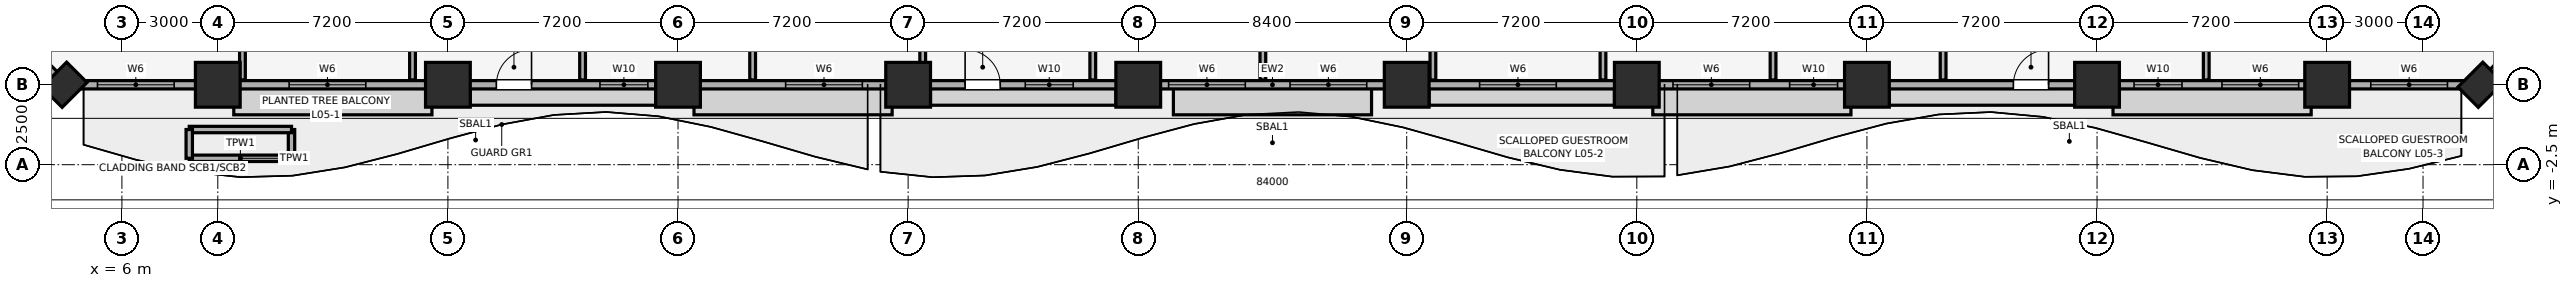
"""IFC4 building model, lengths in metres.
Left out: names, types, materials, properties, quantities, classifications, styles, units other than length and angle.
Written with IfcOpenShell. Run it as: python <this file> out.ifc"""

import sys

from ifc_helpers import new_model, si_unit, direction, frame, frame_2d, origin, origin_2d, place, context, subcontext, project, spatial, rectangle, extrude, element, fill, save


model = new_model("IFC4")
c1 = context("Model", 3, precision=1e-05, world=origin(), true_north=direction((0.0, 1.0)))
c2 = subcontext(c1, "Body", "Model", "MODEL_VIEW")
j1 = project(units=[si_unit("LENGTHUNIT", "METRE"), si_unit("PLANEANGLEUNIT", "RADIAN")], contexts=[c1])
p1 = place(None, origin())
s1 = spatial("IfcSite", under=j1, at=p1, CompositionType="ELEMENT")
p2 = place(p1, origin())
s2 = spatial("IfcBuilding", under=s1, at=p2, CompositionType="ELEMENT")
p3 = place(p2, frame((0.0, 0.0, 31.4)))
s3 = spatial("IfcBuildingStorey", under=s2, at=p3, CompositionType="ELEMENT", Elevation=31.4)
for number, where, z_axis, x_axis in (
    (1, (9.0, 0.0, 0.0), (0.0, 0.0, 1.0), (1.0, 0.0, 0.0)),
    (2, (16.2, 0.0, 0.0), (0.0, 0.0, 1.0), (1.0, 0.0, 0.0)),
    (3, (23.4, 0.0, 0.0), (0.0, 0.0, 1.0), (1.0, 0.0, 0.0)),
    (4, (30.6, 0.0, 0.0), (0.0, 0.0, 1.0), (1.0, 0.0, 0.0)),
    (5, (37.8, 0.0, 0.0), (0.0, 0.0, 1.0), (1.0, 0.0, 0.0)),
    (6, (46.2, 0.0, 0.0), (0.0, 0.0, 1.0), (1.0, 0.0, 0.0)),
    (7, (53.4, 0.0, 0.0), (0.0, 0.0, 1.0), (1.0, 0.0, 0.0)),
    (8, (60.6, 0.0, 0.0), (0.0, 0.0, 1.0), (1.0, 0.0, 0.0)),
    (9, (67.8, 0.0, 0.0), (0.0, 0.0, 1.0), (1.0, 0.0, 0.0)),
    (10, (75.0, 0.0, 0.0), (0.0, 0.0, 1.0), (1.0, 0.0, 0.0)),
):
    element("IfcColumn", number, at=place(p3, frame(where, z_axis=z_axis, x_axis=x_axis)), inside=s3, PredefinedType="COLUMN", context=c2, shape_type="SweptSolid", body=[
        extrude(rectangle(XDim=1.4, YDim=1.4, at=origin_2d()), origin(), (0.0, 0.0, 1.0), 3.51),
    ])
for number, where, z_axis, x_axis in (
    (11, (4.2, 0.0, 0.0), (0.0, 0.0, 1.0), (0.707, 0.707, 0.0)),
    (12, (79.8, 0.0, 0.0), (0.0, 0.0, 1.0), (0.707, 0.707, 0.0)),
):
    element("IfcColumn", number, at=place(p3, frame(where, z_axis=z_axis, x_axis=x_axis)), inside=s3, PredefinedType="PILASTER", context=c2, shape_type="SweptSolid", body=[
        extrude(rectangle(XDim=1.1, YDim=0.9, at=origin_2d()), origin(), (0.0, 0.0, 1.0), 3.51),
    ])
p4 = place(p3, frame((4.2, 0.0, 0.0), z_axis=(0.0, 0.0, 1.0), x_axis=(1.0, 0.0, 0.0)))
e13 = element("IfcWall", 13, at=p4, inside=s3, PredefinedType="SOLIDWALL", context=c2, shape_type="SweptSolid", body=[
    extrude(rectangle(XDim=75.6, YDim=0.26, at=frame_2d((37.8, 0.0))), origin(), (0.0, 0.0, 1.0), 2.56),
])
p5 = place(p4, frame((13.517, 0.0, 0.0)))
e14 = element("IfcOpeningElement", 14, at=p5, cuts=e13, PredefinedType="OPENING", context=c2, shape_type="SweptSolid", body=[
    extrude(rectangle(XDim=1.1, YDim=2.15, at=frame_2d((0.55, 1.075))), frame((0.0, 0.14, 0.0), z_axis=(0.0, -1.0, 0.0), x_axis=(1.0, 0.0, 0.0)), (0.0, 0.0, 1.0), 0.28),
])
p6 = place(p4, frame((28.183, 0.0, 0.0)))
e15 = element("IfcOpeningElement", 15, at=p6, cuts=e13, PredefinedType="OPENING", context=c2, shape_type="SweptSolid", body=[
    extrude(rectangle(XDim=1.1, YDim=2.15, at=frame_2d((0.55, 1.075))), frame((0.0, 0.14, 0.0), z_axis=(0.0, -1.0, 0.0), x_axis=(1.0, 0.0, 0.0)), (0.0, 0.0, 1.0), 0.28),
])
p7 = place(p4, frame((60.983, 0.0, 0.0)))
e16 = element("IfcOpeningElement", 16, at=p7, cuts=e13, PredefinedType="OPENING", context=c2, shape_type="SweptSolid", body=[
    extrude(rectangle(XDim=1.1, YDim=2.15, at=frame_2d((0.55, 1.075))), frame((0.0, 0.14, 0.0), z_axis=(0.0, -1.0, 0.0), x_axis=(1.0, 0.0, 0.0)), (0.0, 0.0, 1.0), 0.28),
])
p8 = place(p4, frame((1.035, 0.0, 0.85)))
e17 = element("IfcOpeningElement", 17, at=p8, cuts=e13, PredefinedType="OPENING", context=c2, shape_type="SweptSolid", body=[
    extrude(rectangle(XDim=2.4, YDim=1.5, at=frame_2d((1.2, 0.75))), frame((0.0, 0.14, 0.0), z_axis=(0.0, -1.0, 0.0), x_axis=(1.0, 0.0, 0.0)), (0.0, 0.0, 1.0), 0.28),
])
p9 = place(p4, frame((7.031, 0.0, 0.85)))
e18 = element("IfcOpeningElement", 18, at=p9, cuts=e13, PredefinedType="OPENING", context=c2, shape_type="SweptSolid", body=[
    extrude(rectangle(XDim=2.4, YDim=1.5, at=frame_2d((1.2, 0.75))), frame((0.0, 0.14, 0.0), z_axis=(0.0, -1.0, 0.0), x_axis=(1.0, 0.0, 0.0)), (0.0, 0.0, 1.0), 0.28),
])
p10 = place(p4, frame((16.757, 0.0, 0.85)))
e19 = element("IfcOpeningElement", 19, at=p10, cuts=e13, PredefinedType="OPENING", context=c2, shape_type="SweptSolid", body=[
    extrude(rectangle(XDim=1.5, YDim=1.4, at=frame_2d((0.75, 0.7))), frame((0.0, 0.14, 0.0), z_axis=(0.0, -1.0, 0.0), x_axis=(1.0, 0.0, 0.0)), (0.0, 0.0, 1.0), 0.28),
])
p11 = place(p4, frame((22.567, 0.0, 0.85)))
e20 = element("IfcOpeningElement", 20, at=p11, cuts=e13, PredefinedType="OPENING", context=c2, shape_type="SweptSolid", body=[
    extrude(rectangle(XDim=2.4, YDim=1.5, at=frame_2d((1.2, 0.75))), frame((0.0, 0.14, 0.0), z_axis=(0.0, -1.0, 0.0), x_axis=(1.0, 0.0, 0.0)), (0.0, 0.0, 1.0), 0.28),
])
p12 = place(p4, frame((30.065, 0.0, 0.85)))
e21 = element("IfcOpeningElement", 21, at=p12, cuts=e13, PredefinedType="OPENING", context=c2, shape_type="SweptSolid", body=[
    extrude(rectangle(XDim=1.5, YDim=1.4, at=frame_2d((0.75, 0.7))), frame((0.0, 0.14, 0.0), z_axis=(0.0, -1.0, 0.0), x_axis=(1.0, 0.0, 0.0)), (0.0, 0.0, 1.0), 0.28),
])
p13 = place(p4, frame((34.55, 0.0, 0.85)))
e22 = element("IfcOpeningElement", 22, at=p13, cuts=e13, PredefinedType="OPENING", context=c2, shape_type="SweptSolid", body=[
    extrude(rectangle(XDim=2.4, YDim=1.5, at=frame_2d((1.2, 0.75))), frame((0.0, 0.14, 0.0), z_axis=(0.0, -1.0, 0.0), x_axis=(1.0, 0.0, 0.0)), (0.0, 0.0, 1.0), 0.28),
])
p14 = place(p4, frame((38.35, 0.0, 0.85)))
e23 = element("IfcOpeningElement", 23, at=p14, cuts=e13, PredefinedType="OPENING", context=c2, shape_type="SweptSolid", body=[
    extrude(rectangle(XDim=2.4, YDim=1.5, at=frame_2d((1.2, 0.75))), frame((0.0, 0.14, 0.0), z_axis=(0.0, -1.0, 0.0), x_axis=(1.0, 0.0, 0.0)), (0.0, 0.0, 1.0), 0.28),
])
p15 = place(p4, frame((44.281, 0.0, 0.85)))
e24 = element("IfcOpeningElement", 24, at=p15, cuts=e13, PredefinedType="OPENING", context=c2, shape_type="SweptSolid", body=[
    extrude(rectangle(XDim=2.4, YDim=1.5, at=frame_2d((1.2, 0.75))), frame((0.0, 0.14, 0.0), z_axis=(0.0, -1.0, 0.0), x_axis=(1.0, 0.0, 0.0)), (0.0, 0.0, 1.0), 0.28),
])
p16 = place(p4, frame((50.332, 0.0, 0.85)))
e25 = element("IfcOpeningElement", 25, at=p16, cuts=e13, PredefinedType="OPENING", context=c2, shape_type="SweptSolid", body=[
    extrude(rectangle(XDim=2.4, YDim=1.5, at=frame_2d((1.2, 0.75))), frame((0.0, 0.14, 0.0), z_axis=(0.0, -1.0, 0.0), x_axis=(1.0, 0.0, 0.0)), (0.0, 0.0, 1.0), 0.28),
])
p17 = place(p4, frame((53.981, 0.0, 0.85)))
e26 = element("IfcOpeningElement", 26, at=p17, cuts=e13, PredefinedType="OPENING", context=c2, shape_type="SweptSolid", body=[
    extrude(rectangle(XDim=1.5, YDim=1.4, at=frame_2d((0.75, 0.7))), frame((0.0, 0.14, 0.0), z_axis=(0.0, -1.0, 0.0), x_axis=(1.0, 0.0, 0.0)), (0.0, 0.0, 1.0), 0.28),
])
p18 = place(p4, frame((64.759, 0.0, 0.85)))
e27 = element("IfcOpeningElement", 27, at=p18, cuts=e13, PredefinedType="OPENING", context=c2, shape_type="SweptSolid", body=[
    extrude(rectangle(XDim=1.5, YDim=1.4, at=frame_2d((0.75, 0.7))), frame((0.0, 0.14, 0.0), z_axis=(0.0, -1.0, 0.0), x_axis=(1.0, 0.0, 0.0)), (0.0, 0.0, 1.0), 0.28),
])
p19 = place(p4, frame((67.509, 0.0, 0.85)))
e28 = element("IfcOpeningElement", 28, at=p19, cuts=e13, PredefinedType="OPENING", context=c2, shape_type="SweptSolid", body=[
    extrude(rectangle(XDim=2.4, YDim=1.5, at=frame_2d((1.2, 0.75))), frame((0.0, 0.14, 0.0), z_axis=(0.0, -1.0, 0.0), x_axis=(1.0, 0.0, 0.0)), (0.0, 0.0, 1.0), 0.28),
])
p20 = place(p4, frame((72.165, 0.0, 0.85)))
e29 = element("IfcOpeningElement", 29, at=p20, cuts=e13, PredefinedType="OPENING", context=c2, shape_type="SweptSolid", body=[
    extrude(rectangle(XDim=2.4, YDim=1.5, at=frame_2d((1.2, 0.75))), frame((0.0, 0.14, 0.0), z_axis=(0.0, -1.0, 0.0), x_axis=(1.0, 0.0, 0.0)), (0.0, 0.0, 1.0), 0.28),
])
for number, where, z_axis, x_axis in (
    (30, (79.8, 0.0, 0.0), (0.0, 0.0, 1.0), (0.707, 0.707, 0.0)),
    (31, (0.0, 4.2, 0.0), (0.0, 0.0, 1.0), (0.707, -0.707, 0.0)),
):
    element("IfcWall", number, at=place(p3, frame(where, z_axis=z_axis, x_axis=x_axis)), inside=s3, PredefinedType="SOLIDWALL", context=c2, shape_type="SweptSolid", body=[
        extrude(rectangle(XDim=5.94, YDim=0.26, at=frame_2d((2.97, 0.0))), origin(), (0.0, 0.0, 1.0), 2.56),
    ])
p21 = place(p3, frame((8.107, -2.3, 0.0), z_axis=(0.0, 0.0, 1.0), x_axis=(1.0, 0.0, 0.0)))
e32 = element("IfcWall", 32, at=p21, inside=s3, PredefinedType="PARAPET", context=c2, shape_type="SweptSolid", body=[
    extrude(rectangle(XDim=3.2, YDim=0.2, at=frame_2d((1.6, 0.0))), origin(), (0.0, 0.0, 1.0), 0.55),
])
p22 = place(p3, frame((11.307, -2.3, 0.0), z_axis=(0.0, 0.0, 1.0), x_axis=(0.0, 1.0, 0.0)))
e33 = element("IfcWall", 33, at=p22, inside=s3, PredefinedType="PARAPET", context=c2, shape_type="SweptSolid", body=[
    extrude(rectangle(XDim=0.9, YDim=0.2, at=frame_2d((0.45, 0.0))), origin(), (0.0, 0.0, 1.0), 0.55),
])
p23 = place(p3, frame((11.307, -1.4, 0.0), z_axis=(0.0, 0.0, 1.0), x_axis=(-1.0, 0.0, 0.0)))
e34 = element("IfcWall", 34, at=p23, inside=s3, PredefinedType="PARAPET", context=c2, shape_type="SweptSolid", body=[
    extrude(rectangle(XDim=3.2, YDim=0.2, at=frame_2d((1.6, 0.0))), origin(), (0.0, 0.0, 1.0), 0.55),
])
p24 = place(p3, frame((8.107, -1.4, 0.0), z_axis=(0.0, 0.0, 1.0), x_axis=(0.0, -1.0, 0.0)))
e35 = element("IfcWall", 35, at=p24, inside=s3, PredefinedType="PARAPET", context=c2, shape_type="SweptSolid", body=[
    extrude(rectangle(XDim=0.9, YDim=0.2, at=frame_2d((0.45, 0.0))), origin(), (0.0, 0.0, 1.0), 0.55),
])
p25 = place(p3, frame((9.771, 0.15, 0.0), z_axis=(0.0, 0.0, 1.0), x_axis=(0.0, 1.0, 0.0)))
e36 = element("IfcWall", 36, at=p25, inside=s3, PredefinedType="PARTITIONING", context=c2, shape_type="SweptSolid", body=[
    extrude(rectangle(XDim=8.555, YDim=0.18, at=frame_2d((4.278, 0.0))), origin(), (0.0, 0.0, 1.0), 2.88),
])
for number, where, z_axis, x_axis in (
    (37, (15.093, 0.15, 0.0), (0.0, 0.0, 1.0), (0.0, 1.0, 0.0)),
    (38, (20.414, 0.15, 0.0), (0.0, 0.0, 1.0), (0.0, 1.0, 0.0)),
    (39, (25.735, 0.15, 0.0), (0.0, 0.0, 1.0), (0.0, 1.0, 0.0)),
):
    element("IfcWall", number, at=place(p3, frame(where, z_axis=z_axis, x_axis=x_axis)), inside=s3, PredefinedType="PARTITIONING", context=c2, shape_type="SweptSolid", body=[
        extrude(rectangle(XDim=8.555, YDim=0.18, at=frame_2d((4.278, 0.0))), origin(), (0.0, 0.0, 1.0), 3.51),
    ])
p26 = place(p3, frame((31.056, 0.15, 0.0), z_axis=(0.0, 0.0, 1.0), x_axis=(0.0, 1.0, 0.0)))
e40 = element("IfcWall", 40, at=p26, inside=s3, PredefinedType="PARTITIONING", context=c2, shape_type="SweptSolid", body=[
    extrude(rectangle(XDim=8.555, YDim=0.18, at=frame_2d((4.278, 0.0))), origin(), (0.0, 0.0, 1.0), 2.88),
])
for number, where, z_axis, x_axis in (
    (41, (36.377, 0.15, 0.0), (0.0, 0.0, 1.0), (0.0, 1.0, 0.0)),
    (42, (41.699, 0.15, 0.0), (0.0, 0.0, 1.0), (0.0, 1.0, 0.0)),
    (43, (47.02, 0.15, 0.0), (0.0, 0.0, 1.0), (0.0, 1.0, 0.0)),
    (44, (52.341, 0.15, 0.0), (0.0, 0.0, 1.0), (0.0, 1.0, 0.0)),
    (45, (57.663, 0.15, 0.0), (0.0, 0.0, 1.0), (0.0, 1.0, 0.0)),
    (46, (62.984, 0.15, 0.0), (0.0, 0.0, 1.0), (0.0, 1.0, 0.0)),
):
    element("IfcWall", number, at=place(p3, frame(where, z_axis=z_axis, x_axis=x_axis)), inside=s3, PredefinedType="PARTITIONING", context=c2, shape_type="SweptSolid", body=[
        extrude(rectangle(XDim=8.555, YDim=0.18, at=frame_2d((4.278, 0.0))), origin(), (0.0, 0.0, 1.0), 3.51),
    ])
p27 = place(p3, frame((71.217, 0.15, 0.0), z_axis=(0.0, 0.0, 1.0), x_axis=(0.0, 1.0, 0.0)))
e47 = element("IfcWall", 47, at=p27, inside=s3, PredefinedType="PARTITIONING", context=c2, shape_type="SweptSolid", body=[
    extrude(rectangle(XDim=8.555, YDim=0.18, at=frame_2d((4.278, 0.0))), origin(), (0.0, 0.0, 1.0), 2.898),
])
p28 = place(p5, origin())
e48 = element("IfcDoor", 48, at=p28, inside=s3, OperationType="SINGLE_SWING_RIGHT", PredefinedType="DOOR", context=c2, shape_type="SweptSolid", body=[
    extrude(rectangle(XDim=1.1, YDim=2.15, at=frame_2d((0.55, 1.075))), frame((0.0, 0.025, 0.0), z_axis=(0.0, -1.0, 0.0), x_axis=(1.0, 0.0, 0.0)), (0.0, 0.0, 1.0), 0.05),
])
fill(e14, e48)
p29 = place(p6, origin())
e49 = element("IfcDoor", 49, at=p29, inside=s3, OperationType="SINGLE_SWING_LEFT", PredefinedType="DOOR", context=c2, shape_type="SweptSolid", body=[
    extrude(rectangle(XDim=1.1, YDim=2.15, at=frame_2d((0.55, 1.075))), frame((0.0, 0.025, 0.0), z_axis=(0.0, -1.0, 0.0), x_axis=(1.0, 0.0, 0.0)), (0.0, 0.0, 1.0), 0.05),
])
fill(e15, e49)
p30 = place(p7, origin())
e50 = element("IfcDoor", 50, at=p30, inside=s3, OperationType="SINGLE_SWING_RIGHT", PredefinedType="DOOR", context=c2, shape_type="SweptSolid", body=[
    extrude(rectangle(XDim=1.1, YDim=2.15, at=frame_2d((0.55, 1.075))), frame((0.0, 0.025, 0.0), z_axis=(0.0, -1.0, 0.0), x_axis=(1.0, 0.0, 0.0)), (0.0, 0.0, 1.0), 0.05),
])
fill(e16, e50)
p31 = place(p8, origin())
e51 = element("IfcWindow", 51, at=p31, inside=s3, PartitioningType="SINGLE_PANEL", PredefinedType="WINDOW", context=c2, shape_type="SweptSolid", body=[
    extrude(rectangle(XDim=2.4, YDim=1.5, at=frame_2d((1.2, 0.75))), frame((0.0, 0.03, 0.0), z_axis=(0.0, -1.0, 0.0), x_axis=(1.0, 0.0, 0.0)), (0.0, 0.0, 1.0), 0.06),
])
fill(e17, e51)
p32 = place(p9, origin())
e52 = element("IfcWindow", 52, at=p32, inside=s3, PartitioningType="SINGLE_PANEL", PredefinedType="WINDOW", context=c2, shape_type="SweptSolid", body=[
    extrude(rectangle(XDim=2.4, YDim=1.5, at=frame_2d((1.2, 0.75))), frame((0.0, 0.03, 0.0), z_axis=(0.0, -1.0, 0.0), x_axis=(1.0, 0.0, 0.0)), (0.0, 0.0, 1.0), 0.06),
])
fill(e18, e52)
p33 = place(p10, origin())
e53 = element("IfcWindow", 53, at=p33, inside=s3, PartitioningType="SINGLE_PANEL", PredefinedType="WINDOW", context=c2, shape_type="SweptSolid", body=[
    extrude(rectangle(XDim=1.5, YDim=1.4, at=frame_2d((0.75, 0.7))), frame((0.0, 0.03, 0.0), z_axis=(0.0, -1.0, 0.0), x_axis=(1.0, 0.0, 0.0)), (0.0, 0.0, 1.0), 0.06),
])
fill(e19, e53)
p34 = place(p11, origin())
e54 = element("IfcWindow", 54, at=p34, inside=s3, PartitioningType="SINGLE_PANEL", PredefinedType="WINDOW", context=c2, shape_type="SweptSolid", body=[
    extrude(rectangle(XDim=2.4, YDim=1.5, at=frame_2d((1.2, 0.75))), frame((0.0, 0.03, 0.0), z_axis=(0.0, -1.0, 0.0), x_axis=(1.0, 0.0, 0.0)), (0.0, 0.0, 1.0), 0.06),
])
fill(e20, e54)
p35 = place(p12, origin())
e55 = element("IfcWindow", 55, at=p35, inside=s3, PartitioningType="SINGLE_PANEL", PredefinedType="WINDOW", context=c2, shape_type="SweptSolid", body=[
    extrude(rectangle(XDim=1.5, YDim=1.4, at=frame_2d((0.75, 0.7))), frame((0.0, 0.03, 0.0), z_axis=(0.0, -1.0, 0.0), x_axis=(1.0, 0.0, 0.0)), (0.0, 0.0, 1.0), 0.06),
])
fill(e21, e55)
p36 = place(p13, origin())
e56 = element("IfcWindow", 56, at=p36, inside=s3, PartitioningType="SINGLE_PANEL", PredefinedType="WINDOW", context=c2, shape_type="SweptSolid", body=[
    extrude(rectangle(XDim=2.4, YDim=1.5, at=frame_2d((1.2, 0.75))), frame((0.0, 0.03, 0.0), z_axis=(0.0, -1.0, 0.0), x_axis=(1.0, 0.0, 0.0)), (0.0, 0.0, 1.0), 0.06),
])
fill(e22, e56)
p37 = place(p14, origin())
e57 = element("IfcWindow", 57, at=p37, inside=s3, PartitioningType="SINGLE_PANEL", PredefinedType="WINDOW", context=c2, shape_type="SweptSolid", body=[
    extrude(rectangle(XDim=2.4, YDim=1.5, at=frame_2d((1.2, 0.75))), frame((0.0, 0.03, 0.0), z_axis=(0.0, -1.0, 0.0), x_axis=(1.0, 0.0, 0.0)), (0.0, 0.0, 1.0), 0.06),
])
fill(e23, e57)
p38 = place(p15, origin())
e58 = element("IfcWindow", 58, at=p38, inside=s3, PartitioningType="SINGLE_PANEL", PredefinedType="WINDOW", context=c2, shape_type="SweptSolid", body=[
    extrude(rectangle(XDim=2.4, YDim=1.5, at=frame_2d((1.2, 0.75))), frame((0.0, 0.03, 0.0), z_axis=(0.0, -1.0, 0.0), x_axis=(1.0, 0.0, 0.0)), (0.0, 0.0, 1.0), 0.06),
])
fill(e24, e58)
p39 = place(p16, origin())
e59 = element("IfcWindow", 59, at=p39, inside=s3, PartitioningType="SINGLE_PANEL", PredefinedType="WINDOW", context=c2, shape_type="SweptSolid", body=[
    extrude(rectangle(XDim=2.4, YDim=1.5, at=frame_2d((1.2, 0.75))), frame((0.0, 0.03, 0.0), z_axis=(0.0, -1.0, 0.0), x_axis=(1.0, 0.0, 0.0)), (0.0, 0.0, 1.0), 0.06),
])
fill(e25, e59)
p40 = place(p17, origin())
e60 = element("IfcWindow", 60, at=p40, inside=s3, PartitioningType="SINGLE_PANEL", PredefinedType="WINDOW", context=c2, shape_type="SweptSolid", body=[
    extrude(rectangle(XDim=1.5, YDim=1.4, at=frame_2d((0.75, 0.7))), frame((0.0, 0.03, 0.0), z_axis=(0.0, -1.0, 0.0), x_axis=(1.0, 0.0, 0.0)), (0.0, 0.0, 1.0), 0.06),
])
fill(e26, e60)
p41 = place(p18, origin())
e61 = element("IfcWindow", 61, at=p41, inside=s3, PartitioningType="SINGLE_PANEL", PredefinedType="WINDOW", context=c2, shape_type="SweptSolid", body=[
    extrude(rectangle(XDim=1.5, YDim=1.4, at=frame_2d((0.75, 0.7))), frame((0.0, 0.03, 0.0), z_axis=(0.0, -1.0, 0.0), x_axis=(1.0, 0.0, 0.0)), (0.0, 0.0, 1.0), 0.06),
])
fill(e27, e61)
p42 = place(p19, origin())
e62 = element("IfcWindow", 62, at=p42, inside=s3, PartitioningType="SINGLE_PANEL", PredefinedType="WINDOW", context=c2, shape_type="SweptSolid", body=[
    extrude(rectangle(XDim=2.4, YDim=1.5, at=frame_2d((1.2, 0.75))), frame((0.0, 0.03, 0.0), z_axis=(0.0, -1.0, 0.0), x_axis=(1.0, 0.0, 0.0)), (0.0, 0.0, 1.0), 0.06),
])
fill(e28, e62)
p43 = place(p20, origin())
e63 = element("IfcWindow", 63, at=p43, inside=s3, PartitioningType="SINGLE_PANEL", PredefinedType="WINDOW", context=c2, shape_type="SweptSolid", body=[
    extrude(rectangle(XDim=2.4, YDim=1.5, at=frame_2d((1.2, 0.75))), frame((0.0, 0.03, 0.0), z_axis=(0.0, -1.0, 0.0), x_axis=(1.0, 0.0, 0.0)), (0.0, 0.0, 1.0), 0.06),
])
fill(e29, e63)
save(model, sys.argv[1])
